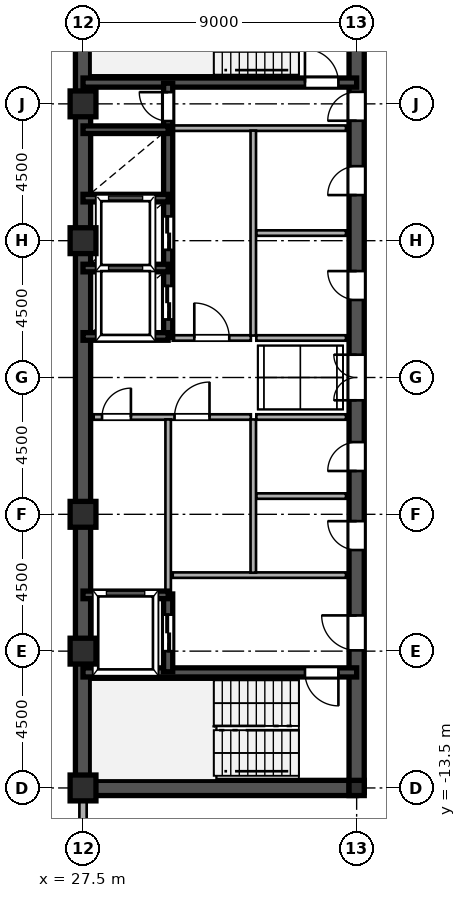
"""IFC4 building model, lengths in metres.
Left out: names, types, materials, properties, quantities, classifications, styles, units other than length and angle.
Written with IfcOpenShell. Run it as: python <this file> out.ifc"""

import sys

from ifc_helpers import new_model, si_unit, direction, frame, frame_2d, origin, origin_2d, place, context, subcontext, project, spatial, rectangle, hollow_rectangle, i_section, extrude, source, transform, mapped, element, fill, save


model = new_model("IFC4")
c1 = context("Model", 3, precision=1e-05, world=origin(), true_north=direction((0.0, 1.0)))
c2 = subcontext(c1, "Body", "Model", "MODEL_VIEW")
j1 = project(units=[si_unit("LENGTHUNIT", "METRE"), si_unit("PLANEANGLEUNIT", "RADIAN")], contexts=[c1])
p1 = place(None, origin())
s1 = spatial("IfcSite", under=j1, at=p1, CompositionType="ELEMENT")
p2 = place(p1, origin())
s2 = spatial("IfcBuilding", under=s1, at=p2, CompositionType="ELEMENT")
p3 = place(p2, frame((0.0, 0.0, 210.3)))
s3 = spatial("IfcBuildingStorey", under=s2, at=p3, CompositionType="ELEMENT", Elevation=210.3)
m1 = source(origin(), c2, "Body", "SweptSolid", [
    extrude(hollow_rectangle(XDim=0.85, YDim=0.85, WallThickness=0.036, at=origin_2d()), origin(), (0.0, 0.0, 1.0), 3.6),
])
for number, where, z_axis, x_axis in (
    (1, (27.5, -13.5, 0.0), (0.0, 0.0, 1.0), (1.0, 0.0, 0.0)),
    (2, (27.5, -9.0, 0.0), (0.0, 0.0, 1.0), (1.0, 0.0, 0.0)),
    (3, (27.5, -4.5, 0.0), (0.0, 0.0, 1.0), (1.0, 0.0, 0.0)),
    (4, (27.5, 4.5, 0.0), (0.0, 0.0, 1.0), (1.0, 0.0, 0.0)),
    (5, (27.5, 9.0, 0.0), (0.0, 0.0, 1.0), (1.0, 0.0, 0.0)),
):
    element("IfcColumn", number, at=place(p3, frame(where, z_axis=z_axis, x_axis=x_axis)), inside=s3, PredefinedType="COLUMN", context=c2, shape_type="MappedRepresentation", body=[
        mapped(m1, transform((0.0, 0.0, 0.0), scale=1.0)),
    ])
m2 = source(origin(), c2, "Body", "SweptSolid", [
    extrude(i_section(OverallWidth=0.5, OverallDepth=0.5, WebThickness=0.02, FlangeThickness=0.032, at=origin_2d()), origin(), (0.0, 0.0, 1.0), 3.6),
])
p4 = place(p3, frame((36.5, -13.5, 0.0), z_axis=(0.0, 0.0, 1.0), x_axis=(1.0, 0.0, 0.0)))
e6 = element("IfcColumn", 6, at=p4, inside=s3, PredefinedType="COLUMN", context=c2, shape_type="MappedRepresentation", body=[
    mapped(m2, transform((0.0, 0.0, 0.0), scale=1.0)),
])
p5 = place(p3, frame((27.5, -15.98, 0.0), z_axis=(0.0, 0.0, 1.0), x_axis=(0.0, 1.0, 0.0)))
e7 = element("IfcWall", 7, at=p5, inside=s3, PredefinedType="SOLIDWALL", context=c2, shape_type="SweptSolid", body=[
    extrude(rectangle(XDim=1.605, YDim=0.24, at=frame_2d((0.803, 0.0))), origin(), (0.0, 0.0, 1.0), 3.38),
])
p6 = place(p3, frame((27.5, -14.375, 0.0), z_axis=(0.0, 0.0, 1.0), x_axis=(0.0, 1.0, 0.0)))
e8 = element("IfcWall", 8, at=p6, inside=s3, PredefinedType="SOLIDWALL", context=c2, shape_type="SweptSolid", body=[
    extrude(rectangle(XDim=0.62, YDim=0.24, at=frame_2d((0.31, 0.0))), origin(), (0.0, 0.0, 1.0), 2.88),
])
for number, where, z_axis, x_axis in (
    (9, (27.5, -13.5, 0.0), (0.0, 0.0, 1.0), (0.0, 1.0, 0.0)),
    (10, (27.5, 1.3, 0.0), (0.0, 0.0, 1.0), (0.0, 1.0, 0.0)),
):
    element("IfcWall", number, at=place(p3, frame(where, z_axis=z_axis, x_axis=x_axis)), inside=s3, PredefinedType="SHEAR", context=c2, shape_type="SweptSolid", body=[
        extrude(rectangle(XDim=12.2, YDim=0.5, at=frame_2d((6.1, 0.0))), origin(), (0.0, 0.0, 1.0), 3.38),
    ])
p7 = place(p3, frame((27.5, -1.3, 0.0), z_axis=(0.0, 0.0, 1.0), x_axis=(0.0, 1.0, 0.0)))
e11 = element("IfcWall", 11, at=p7, inside=s3, PredefinedType="SHEAR", context=c2, shape_type="SweptSolid", body=[
    extrude(rectangle(XDim=2.6, YDim=0.5, at=frame_2d((1.3, 0.0))), origin(), (0.0, 0.0, 1.0), 3.38),
])
p8 = place(p3, frame((27.5, -13.5, 0.0), z_axis=(0.0, 0.0, 1.0), x_axis=(1.0, 0.0, 0.0)))
e12 = element("IfcWall", 12, at=p8, inside=s3, PredefinedType="SHEAR", context=c2, shape_type="SweptSolid", body=[
    extrude(rectangle(XDim=9.0, YDim=0.5, at=frame_2d((4.5, 0.0))), origin(), (0.0, 0.0, 1.0), 3.38),
])
p9 = place(p3, frame((36.5, -13.65, 0.0), z_axis=(0.0, 0.0, 1.0), x_axis=(0.0, 1.0, 0.0)))
e13 = element("IfcWall", 13, at=p9, inside=s3, PredefinedType="SHEAR", context=c2, shape_type="SweptSolid", body=[
    extrude(rectangle(XDim=7.15, YDim=0.5, at=frame_2d((3.575, 0.0))), origin(), (0.0, 0.0, 1.0), 3.38),
])
p10 = place(p9, frame((4.675, 0.0, 0.0)))
e14 = element("IfcOpeningElement", 14, at=p10, cuts=e13, PredefinedType="OPENING", context=c2, shape_type="SweptSolid", body=[
    extrude(rectangle(XDim=1.15, YDim=2.2, at=frame_2d((0.575, 1.1))), frame((0.0, 0.26, 0.0), z_axis=(0.0, -1.0, 0.0), x_axis=(1.0, 0.0, 0.0)), (0.0, 0.0, 1.0), 0.52),
])
p11 = place(p3, frame((36.5, -1.3, 0.0), z_axis=(0.0, 0.0, 1.0), x_axis=(0.0, 1.0, 0.0)))
e15 = element("IfcWall", 15, at=p11, inside=s3, PredefinedType="SHEAR", context=c2, shape_type="SweptSolid", body=[
    extrude(rectangle(XDim=2.6, YDim=0.5, at=frame_2d((1.3, 0.0))), origin(), (0.0, 0.0, 1.0), 3.38),
])
p12 = place(p11, frame((0.55, 0.0, 0.0)))
e16 = element("IfcOpeningElement", 16, at=p12, cuts=e15, PredefinedType="OPENING", context=c2, shape_type="SweptSolid", body=[
    extrude(rectangle(XDim=1.5, YDim=2.3, at=frame_2d((0.75, 1.15))), frame((0.0, 0.26, 0.0), z_axis=(0.0, -1.0, 0.0), x_axis=(1.0, 0.0, 0.0)), (0.0, 0.0, 1.0), 0.52),
])
p13 = place(p3, frame((36.5, 8.2, 0.0), z_axis=(0.0, 0.0, 1.0), x_axis=(0.0, 1.0, 0.0)))
e17 = element("IfcWall", 17, at=p13, inside=s3, PredefinedType="SHEAR", context=c2, shape_type="SweptSolid", body=[
    extrude(rectangle(XDim=5.45, YDim=0.5, at=frame_2d((2.725, 0.0))), origin(), (0.0, 0.0, 1.0), 3.38),
])
p14 = place(p13, frame((0.245, 0.0, 0.0)))
e18 = element("IfcOpeningElement", 18, at=p14, cuts=e17, PredefinedType="OPENING", context=c2, shape_type="SweptSolid", body=[
    extrude(rectangle(XDim=0.95, YDim=2.15, at=frame_2d((0.475, 1.075))), frame((0.0, 0.26, 0.0), z_axis=(0.0, -1.0, 0.0), x_axis=(1.0, 0.0, 0.0)), (0.0, 0.0, 1.0), 0.52),
])
p15 = place(p3, frame((36.5, -6.5, 0.0), z_axis=(0.0, 0.0, 1.0), x_axis=(0.0, 1.0, 0.0)))
e19 = element("IfcWall", 19, at=p15, inside=s3, PredefinedType="SHEAR", context=c2, shape_type="SweptSolid", body=[
    extrude(rectangle(XDim=2.6, YDim=0.5, at=frame_2d((1.3, 0.0))), origin(), (0.0, 0.0, 1.0), 3.38),
])
p16 = place(p15, frame((0.825, 0.0, 0.0)))
e20 = element("IfcOpeningElement", 20, at=p16, cuts=e19, PredefinedType="OPENING", context=c2, shape_type="SweptSolid", body=[
    extrude(rectangle(XDim=0.95, YDim=2.15, at=frame_2d((0.475, 1.075))), frame((0.0, 0.26, 0.0), z_axis=(0.0, -1.0, 0.0), x_axis=(1.0, 0.0, 0.0)), (0.0, 0.0, 1.0), 0.52),
])
p17 = place(p3, frame((36.5, -3.9, 0.0), z_axis=(0.0, 0.0, 1.0), x_axis=(0.0, 1.0, 0.0)))
e21 = element("IfcWall", 21, at=p17, inside=s3, PredefinedType="SHEAR", context=c2, shape_type="SweptSolid", body=[
    extrude(rectangle(XDim=2.6, YDim=0.5, at=frame_2d((1.3, 0.0))), origin(), (0.0, 0.0, 1.0), 3.38),
])
p18 = place(p17, frame((0.825, 0.0, 0.0)))
e22 = element("IfcOpeningElement", 22, at=p18, cuts=e21, PredefinedType="OPENING", context=c2, shape_type="SweptSolid", body=[
    extrude(rectangle(XDim=0.95, YDim=2.15, at=frame_2d((0.475, 1.075))), frame((0.0, 0.26, 0.0), z_axis=(0.0, -1.0, 0.0), x_axis=(1.0, 0.0, 0.0)), (0.0, 0.0, 1.0), 0.52),
])
p19 = place(p3, frame((36.5, 1.3, 0.0), z_axis=(0.0, 0.0, 1.0), x_axis=(0.0, 1.0, 0.0)))
e23 = element("IfcWall", 23, at=p19, inside=s3, PredefinedType="SHEAR", context=c2, shape_type="SweptSolid", body=[
    extrude(rectangle(XDim=3.45, YDim=0.5, at=frame_2d((1.725, 0.0))), origin(), (0.0, 0.0, 1.0), 3.38),
])
p20 = place(p19, frame((1.25, 0.0, 0.0)))
e24 = element("IfcOpeningElement", 24, at=p20, cuts=e23, PredefinedType="OPENING", context=c2, shape_type="SweptSolid", body=[
    extrude(rectangle(XDim=0.95, YDim=2.15, at=frame_2d((0.475, 1.075))), frame((0.0, 0.26, 0.0), z_axis=(0.0, -1.0, 0.0), x_axis=(1.0, 0.0, 0.0)), (0.0, 0.0, 1.0), 0.52),
])
p21 = place(p3, frame((36.5, 4.75, 0.0), z_axis=(0.0, 0.0, 1.0), x_axis=(0.0, 1.0, 0.0)))
e25 = element("IfcWall", 25, at=p21, inside=s3, PredefinedType="SHEAR", context=c2, shape_type="SweptSolid", body=[
    extrude(rectangle(XDim=3.45, YDim=0.5, at=frame_2d((1.725, 0.0))), origin(), (0.0, 0.0, 1.0), 3.38),
])
p22 = place(p21, frame((1.25, 0.0, 0.0)))
e26 = element("IfcOpeningElement", 26, at=p22, cuts=e25, PredefinedType="OPENING", context=c2, shape_type="SweptSolid", body=[
    extrude(rectangle(XDim=0.95, YDim=2.15, at=frame_2d((0.475, 1.075))), frame((0.0, 0.26, 0.0), z_axis=(0.0, -1.0, 0.0), x_axis=(1.0, 0.0, 0.0)), (0.0, 0.0, 1.0), 0.52),
])
p23 = place(p3, frame((27.5, -9.7, 0.0), z_axis=(0.0, 0.0, 1.0), x_axis=(1.0, 0.0, 0.0)))
e27 = element("IfcWall", 27, at=p23, inside=s3, PredefinedType="SHEAR", context=c2, shape_type="SweptSolid", body=[
    extrude(rectangle(XDim=9.0, YDim=0.3, at=frame_2d((4.5, 0.0))), origin(), (0.0, 0.0, 1.0), 3.38),
])
p24 = place(p23, frame((7.3, 0.0, 0.0)))
e28 = element("IfcOpeningElement", 28, at=p24, cuts=e27, PredefinedType="OPENING", context=c2, shape_type="SweptSolid", body=[
    extrude(rectangle(XDim=1.1, YDim=2.2, at=frame_2d((0.55, 1.1))), frame((0.0, 0.16, 0.0), z_axis=(0.0, -1.0, 0.0), x_axis=(1.0, 0.0, 0.0)), (0.0, 0.0, 1.0), 0.32),
])
p25 = place(p3, frame((27.5, 9.7, 0.0), z_axis=(0.0, 0.0, 1.0), x_axis=(1.0, 0.0, 0.0)))
e29 = element("IfcWall", 29, at=p25, inside=s3, PredefinedType="SHEAR", context=c2, shape_type="SweptSolid", body=[
    extrude(rectangle(XDim=9.0, YDim=0.3, at=frame_2d((4.5, 0.0))), origin(), (0.0, 0.0, 1.0), 3.38),
])
p26 = place(p25, frame((7.3, 0.0, 0.0)))
e30 = element("IfcOpeningElement", 30, at=p26, cuts=e29, PredefinedType="OPENING", context=c2, shape_type="SweptSolid", body=[
    extrude(rectangle(XDim=1.1, YDim=2.2, at=frame_2d((0.55, 1.1))), frame((0.0, 0.16, 0.0), z_axis=(0.0, -1.0, 0.0), x_axis=(1.0, 0.0, 0.0)), (0.0, 0.0, 1.0), 0.32),
])
for number, where, z_axis, x_axis in (
    (31, (27.5, -7.15, 0.0), (0.0, 0.0, 1.0), (1.0, 0.0, 0.0)),
    (32, (27.5, 1.35, 0.0), (0.0, 0.0, 1.0), (1.0, 0.0, 0.0)),
    (33, (27.5, 3.6, 0.0), (0.0, 0.0, 1.0), (1.0, 0.0, 0.0)),
    (34, (27.5, 5.9, 0.0), (0.0, 0.0, 1.0), (1.0, 0.0, 0.0)),
    (35, (27.5, 8.15, 0.0), (0.0, 0.0, 1.0), (1.0, 0.0, 0.0)),
):
    element("IfcWall", number, at=place(p3, frame(where, z_axis=z_axis, x_axis=x_axis)), inside=s3, PredefinedType="SHEAR", context=c2, shape_type="SweptSolid", body=[
        extrude(rectangle(XDim=2.8, YDim=0.25, at=frame_2d((1.4, 0.0))), origin(), (0.0, 0.0, 1.0), 3.38),
    ])
p27 = place(p3, frame((30.3, -9.68, 0.0), z_axis=(0.0, 0.0, 1.0), x_axis=(0.0, 1.0, 0.0)))
e36 = element("IfcWall", 36, at=p27, inside=s3, PredefinedType="SHEAR", context=c2, shape_type="SweptSolid", body=[
    extrude(rectangle(XDim=2.56, YDim=0.3, at=frame_2d((1.28, 0.0))), origin(), (0.0, 0.0, 1.0), 3.38),
])
p28 = place(p27, frame((0.68, 0.0, 0.0)))
e37 = element("IfcOpeningElement", 37, at=p28, cuts=e36, PredefinedType="OPENING", context=c2, shape_type="SweptSolid", body=[
    extrude(rectangle(XDim=1.2, YDim=2.25, at=frame_2d((0.6, 1.125))), frame((0.0, 0.16, 0.0), z_axis=(0.0, -1.0, 0.0), x_axis=(1.0, 0.0, 0.0)), (0.0, 0.0, 1.0), 0.32),
])
p29 = place(p3, frame((30.3, 1.32, 0.0), z_axis=(0.0, 0.0, 1.0), x_axis=(0.0, 1.0, 0.0)))
e38 = element("IfcWall", 38, at=p29, inside=s3, PredefinedType="SHEAR", context=c2, shape_type="SweptSolid", body=[
    extrude(rectangle(XDim=2.28, YDim=0.3, at=frame_2d((1.14, 0.0))), origin(), (0.0, 0.0, 1.0), 3.38),
])
p30 = place(p29, frame((0.59, 0.0, 0.0)))
e39 = element("IfcOpeningElement", 39, at=p30, cuts=e38, PredefinedType="OPENING", context=c2, shape_type="SweptSolid", body=[
    extrude(rectangle(XDim=1.1, YDim=2.2, at=frame_2d((0.55, 1.1))), frame((0.0, 0.16, 0.0), z_axis=(0.0, -1.0, 0.0), x_axis=(1.0, 0.0, 0.0)), (0.0, 0.0, 1.0), 0.32),
])
p31 = place(p3, frame((30.3, 3.6, 0.0), z_axis=(0.0, 0.0, 1.0), x_axis=(0.0, 1.0, 0.0)))
e40 = element("IfcWall", 40, at=p31, inside=s3, PredefinedType="SHEAR", context=c2, shape_type="SweptSolid", body=[
    extrude(rectangle(XDim=2.3, YDim=0.3, at=frame_2d((1.15, 0.0))), origin(), (0.0, 0.0, 1.0), 3.38),
])
p32 = place(p31, frame((0.6, 0.0, 0.0)))
e41 = element("IfcOpeningElement", 41, at=p32, cuts=e40, PredefinedType="OPENING", context=c2, shape_type="SweptSolid", body=[
    extrude(rectangle(XDim=1.1, YDim=2.2, at=frame_2d((0.55, 1.1))), frame((0.0, 0.16, 0.0), z_axis=(0.0, -1.0, 0.0), x_axis=(1.0, 0.0, 0.0)), (0.0, 0.0, 1.0), 0.32),
])
p33 = place(p3, frame((30.3, 5.9, 0.0), z_axis=(0.0, 0.0, 1.0), x_axis=(0.0, 1.0, 0.0)))
e42 = element("IfcWall", 42, at=p33, inside=s3, PredefinedType="SHEAR", context=c2, shape_type="SweptSolid", body=[
    extrude(rectangle(XDim=2.25, YDim=0.3, at=frame_2d((1.125, 0.0))), origin(), (0.0, 0.0, 1.0), 3.38),
])
p34 = place(p3, frame((30.3, 8.15, 0.0), z_axis=(0.0, 0.0, 1.0), x_axis=(0.0, 1.0, 0.0)))
e43 = element("IfcWall", 43, at=p34, inside=s3, PredefinedType="SHEAR", context=c2, shape_type="SweptSolid", body=[
    extrude(rectangle(XDim=1.53, YDim=0.3, at=frame_2d((0.765, 0.0))), origin(), (0.0, 0.0, 1.0), 3.38),
])
p35 = place(p34, frame((0.285, 0.0, 0.0)))
e44 = element("IfcOpeningElement", 44, at=p35, cuts=e43, PredefinedType="OPENING", context=c2, shape_type="SweptSolid", body=[
    extrude(rectangle(XDim=0.95, YDim=2.15, at=frame_2d((0.475, 1.075))), frame((0.0, 0.16, 0.0), z_axis=(0.0, -1.0, 0.0), x_axis=(1.0, 0.0, 0.0)), (0.0, 0.0, 1.0), 0.32),
])
for number, where, z_axis, x_axis in (
    (45, (30.45, -6.5, 0.0), (0.0, 0.0, 1.0), (1.0, 0.0, 0.0)),
    (46, (30.45, 8.2, 0.0), (0.0, 0.0, 1.0), (1.0, 0.0, 0.0)),
):
    element("IfcWall", number, at=place(p3, frame(where, z_axis=z_axis, x_axis=x_axis)), inside=s3, PredefinedType="PARTITIONING", context=c2, shape_type="SweptSolid", body=[
        extrude(rectangle(XDim=5.7, YDim=0.18, at=frame_2d((2.85, 0.0))), origin(), (0.0, 0.0, 1.0), 3.38),
    ])
p36 = place(p3, frame((33.1, -6.42, 0.0), z_axis=(0.0, 0.0, 1.0), x_axis=(0.0, 1.0, 0.0)))
e47 = element("IfcWall", 47, at=p36, inside=s3, PredefinedType="PARTITIONING", context=c2, shape_type="SweptSolid", body=[
    extrude(rectangle(XDim=5.04, YDim=0.18, at=frame_2d((2.52, 0.0))), origin(), (0.0, 0.0, 1.0), 3.38),
])
p37 = place(p3, frame((33.1, 1.38, 0.0), z_axis=(0.0, 0.0, 1.0), x_axis=(0.0, 1.0, 0.0)))
e48 = element("IfcWall", 48, at=p37, inside=s3, PredefinedType="PARTITIONING", context=c2, shape_type="SweptSolid", body=[
    extrude(rectangle(XDim=6.74, YDim=0.18, at=frame_2d((3.37, 0.0))), origin(), (0.0, 0.0, 1.0), 3.38),
])
p38 = place(p3, frame((27.85, -1.3, 0.0), z_axis=(0.0, 0.0, 1.0), x_axis=(1.0, 0.0, 0.0)))
e49 = element("IfcWall", 49, at=p38, inside=s3, PredefinedType="PARTITIONING", context=c2, shape_type="SweptSolid", body=[
    extrude(rectangle(XDim=2.45, YDim=0.18, at=frame_2d((1.225, 0.0))), origin(), (0.0, 0.0, 1.0), 3.38),
])
p39 = place(p38, frame((0.275, 0.0, 0.0)))
e50 = element("IfcOpeningElement", 50, at=p39, cuts=e49, PredefinedType="OPENING", context=c2, shape_type="SweptSolid", body=[
    extrude(rectangle(XDim=0.95, YDim=2.15, at=frame_2d((0.475, 1.075))), frame((0.0, 0.1, 0.0), z_axis=(0.0, -1.0, 0.0), x_axis=(1.0, 0.0, 0.0)), (0.0, 0.0, 1.0), 0.2),
])
p40 = place(p3, frame((30.3, -1.3, 0.0), z_axis=(0.0, 0.0, 1.0), x_axis=(1.0, 0.0, 0.0)))
e51 = element("IfcWall", 51, at=p40, inside=s3, PredefinedType="PARTITIONING", context=c2, shape_type="SweptSolid", body=[
    extrude(rectangle(XDim=2.72, YDim=0.18, at=frame_2d((1.36, 0.0))), origin(), (0.0, 0.0, 1.0), 3.38),
])
p41 = place(p40, frame((0.21, 0.0, 0.0)))
e52 = element("IfcOpeningElement", 52, at=p41, cuts=e51, PredefinedType="OPENING", context=c2, shape_type="SweptSolid", body=[
    extrude(rectangle(XDim=1.15, YDim=2.2, at=frame_2d((0.575, 1.1))), frame((0.0, 0.1, 0.0), z_axis=(0.0, -1.0, 0.0), x_axis=(1.0, 0.0, 0.0)), (0.0, 0.0, 1.0), 0.2),
])
p42 = place(p3, frame((30.3, -7.12, 0.0), z_axis=(0.0, 0.0, 1.0), x_axis=(0.0, 1.0, 0.0)))
e53 = element("IfcWall", 53, at=p42, inside=s3, PredefinedType="PARTITIONING", context=c2, shape_type="SweptSolid", body=[
    extrude(rectangle(XDim=5.74, YDim=0.18, at=frame_2d((2.87, 0.0))), origin(), (0.0, 0.0, 1.0), 3.38),
])
p43 = place(p3, frame((30.45, 1.3, 0.0), z_axis=(0.0, 0.0, 1.0), x_axis=(1.0, 0.0, 0.0)))
e54 = element("IfcWall", 54, at=p43, inside=s3, PredefinedType="PARTITIONING", context=c2, shape_type="SweptSolid", body=[
    extrude(rectangle(XDim=2.57, YDim=0.18, at=frame_2d((1.285, 0.0))), origin(), (0.0, 0.0, 1.0), 3.38),
])
p44 = place(p43, frame((0.71, 0.0, 0.0)))
e55 = element("IfcOpeningElement", 55, at=p44, cuts=e54, PredefinedType="OPENING", context=c2, shape_type="SweptSolid", body=[
    extrude(rectangle(XDim=1.15, YDim=2.2, at=frame_2d((0.575, 1.1))), frame((0.0, 0.1, 0.0), z_axis=(0.0, -1.0, 0.0), x_axis=(1.0, 0.0, 0.0)), (0.0, 0.0, 1.0), 0.2),
])
for number, where, z_axis, x_axis in (
    (56, (33.2, -1.3, 0.0), (0.0, 0.0, 1.0), (1.0, 0.0, 0.0)),
    (57, (33.2, 1.3, 0.0), (0.0, 0.0, 1.0), (1.0, 0.0, 0.0)),
    (58, (33.2, -3.9, 0.0), (0.0, 0.0, 1.0), (1.0, 0.0, 0.0)),
    (59, (33.2, 4.75, 0.0), (0.0, 0.0, 1.0), (1.0, 0.0, 0.0)),
):
    element("IfcWall", number, at=place(p3, frame(where, z_axis=z_axis, x_axis=x_axis)), inside=s3, PredefinedType="PARTITIONING", context=c2, shape_type="SweptSolid", body=[
        extrude(rectangle(XDim=2.95, YDim=0.18, at=frame_2d((1.475, 0.0))), origin(), (0.0, 0.0, 1.0), 3.38),
    ])
m3 = source(origin(), c2, "Body", "SweptSolid", [
    extrude(rectangle(XDim=1.15, YDim=2.2, at=frame_2d((0.575, 1.1))), frame((0.0, 0.025, 0.0), z_axis=(0.0, -1.0, 0.0), x_axis=(1.0, 0.0, 0.0)), (0.0, 0.0, 1.0), 0.05),
])
p45 = place(p10, origin())
e60 = element("IfcDoor", 60, at=p45, inside=s3, OperationType="SINGLE_SWING_RIGHT", PredefinedType="DOOR", context=c2, shape_type="MappedRepresentation", body=[
    mapped(m3, transform((0.0, 0.0, 0.0), scale=1.0)),
])
fill(e14, e60)
m4 = source(origin(), c2, "Body", "SweptSolid", [
    extrude(rectangle(XDim=1.5, YDim=2.3, at=frame_2d((0.75, 1.15))), frame((0.0, 0.025, 0.0), z_axis=(0.0, -1.0, 0.0), x_axis=(1.0, 0.0, 0.0)), (0.0, 0.0, 1.0), 0.05),
])
p46 = place(p12, origin())
e61 = element("IfcDoor", 61, at=p46, inside=s3, OperationType="DOUBLE_SWING_LEFT", PredefinedType="DOOR", context=c2, shape_type="MappedRepresentation", body=[
    mapped(m4, transform((0.0, 0.0, 0.0), scale=1.0)),
])
fill(e16, e61)
m5 = source(origin(), c2, "Body", "SweptSolid", [
    extrude(rectangle(XDim=0.95, YDim=2.15, at=frame_2d((0.475, 1.075))), frame((0.0, 0.025, 0.0), z_axis=(0.0, -1.0, 0.0), x_axis=(1.0, 0.0, 0.0)), (0.0, 0.0, 1.0), 0.05),
])
p47 = place(p14, origin())
e62 = element("IfcDoor", 62, at=p47, inside=s3, OperationType="SINGLE_SWING_LEFT", PredefinedType="DOOR", context=c2, shape_type="MappedRepresentation", body=[
    mapped(m5, transform((0.0, 0.0, 0.0), scale=1.0)),
])
fill(e18, e62)
p48 = place(p16, origin())
e63 = element("IfcDoor", 63, at=p48, inside=s3, OperationType="SINGLE_SWING_RIGHT", PredefinedType="DOOR", context=c2, shape_type="MappedRepresentation", body=[
    mapped(m5, transform((0.0, 0.0, 0.0), scale=1.0)),
])
fill(e20, e63)
p49 = place(p18, origin())
e64 = element("IfcDoor", 64, at=p49, inside=s3, OperationType="SINGLE_SWING_LEFT", PredefinedType="DOOR", context=c2, shape_type="MappedRepresentation", body=[
    mapped(m5, transform((0.0, 0.0, 0.0), scale=1.0)),
])
fill(e22, e64)
p50 = place(p20, origin())
e65 = element("IfcDoor", 65, at=p50, inside=s3, OperationType="SINGLE_SWING_RIGHT", PredefinedType="DOOR", context=c2, shape_type="MappedRepresentation", body=[
    mapped(m5, transform((0.0, 0.0, 0.0), scale=1.0)),
])
fill(e24, e65)
p51 = place(p22, origin())
e66 = element("IfcDoor", 66, at=p51, inside=s3, OperationType="SINGLE_SWING_LEFT", PredefinedType="DOOR", context=c2, shape_type="MappedRepresentation", body=[
    mapped(m5, transform((0.0, 0.0, 0.0), scale=1.0)),
])
fill(e26, e66)
m6 = source(origin(), c2, "Body", "SweptSolid", [
    extrude(rectangle(XDim=1.1, YDim=2.2, at=frame_2d((0.55, 1.1))), frame((0.0, 0.025, 0.0), z_axis=(0.0, -1.0, 0.0), x_axis=(1.0, 0.0, 0.0)), (0.0, 0.0, 1.0), 0.05),
])
p52 = place(p24, frame((1.1, 0.0, 0.0), z_axis=(0.0, 0.0, 1.0), x_axis=(-1.0, 0.0, 0.0)))
e67 = element("IfcDoor", 67, at=p52, inside=s3, OperationType="SINGLE_SWING_RIGHT", PredefinedType="DOOR", context=c2, shape_type="MappedRepresentation", body=[
    mapped(m6, transform((0.0, 0.0, 0.0), scale=1.0)),
])
fill(e28, e67)
p53 = place(p26, origin())
e68 = element("IfcDoor", 68, at=p53, inside=s3, OperationType="SINGLE_SWING_LEFT", PredefinedType="DOOR", context=c2, shape_type="MappedRepresentation", body=[
    mapped(m6, transform((0.0, 0.0, 0.0), scale=1.0)),
])
fill(e30, e68)
m7 = source(origin(), c2, "Body", "SweptSolid", [
    extrude(rectangle(XDim=1.2, YDim=2.25, at=frame_2d((0.6, 1.125))), frame((0.0, 0.025, 0.0), z_axis=(0.0, -1.0, 0.0), x_axis=(1.0, 0.0, 0.0)), (0.0, 0.0, 1.0), 0.05),
])
p54 = place(p28, origin())
e69 = element("IfcDoor", 69, at=p54, inside=s3, OperationType="DOUBLE_DOOR_SLIDING", PredefinedType="DOOR", context=c2, shape_type="MappedRepresentation", body=[
    mapped(m7, transform((0.0, 0.0, 0.0), scale=1.0)),
])
fill(e37, e69)
m8 = source(origin(), c2, "Body", "SweptSolid", [
    extrude(rectangle(XDim=1.1, YDim=2.2, at=frame_2d((0.55, 1.1))), frame((0.0, 0.025, 0.0), z_axis=(0.0, -1.0, 0.0), x_axis=(1.0, 0.0, 0.0)), (0.0, 0.0, 1.0), 0.05),
])
p55 = place(p30, origin())
e70 = element("IfcDoor", 70, at=p55, inside=s3, OperationType="DOUBLE_DOOR_SLIDING", PredefinedType="DOOR", context=c2, shape_type="MappedRepresentation", body=[
    mapped(m8, transform((0.0, 0.0, 0.0), scale=1.0)),
])
fill(e39, e70)
p56 = place(p32, origin())
e71 = element("IfcDoor", 71, at=p56, inside=s3, OperationType="DOUBLE_DOOR_SLIDING", PredefinedType="DOOR", context=c2, shape_type="MappedRepresentation", body=[
    mapped(m8, transform((0.0, 0.0, 0.0), scale=1.0)),
])
fill(e41, e71)
p57 = place(p35, origin())
e72 = element("IfcDoor", 72, at=p57, inside=s3, OperationType="SINGLE_SWING_RIGHT", PredefinedType="DOOR", context=c2, shape_type="MappedRepresentation", body=[
    mapped(m5, transform((0.0, 0.0, 0.0), scale=1.0)),
])
fill(e44, e72)
p58 = place(p39, origin())
e73 = element("IfcDoor", 73, at=p58, inside=s3, OperationType="SINGLE_SWING_RIGHT", PredefinedType="DOOR", context=c2, shape_type="MappedRepresentation", body=[
    mapped(m5, transform((0.0, 0.0, 0.0), scale=1.0)),
])
fill(e50, e73)
p59 = place(p41, origin())
e74 = element("IfcDoor", 74, at=p59, inside=s3, OperationType="SINGLE_SWING_RIGHT", PredefinedType="DOOR", context=c2, shape_type="MappedRepresentation", body=[
    mapped(m3, transform((0.0, 0.0, 0.0), scale=1.0)),
])
fill(e52, e74)
p60 = place(p44, origin())
e75 = element("IfcDoor", 75, at=p60, inside=s3, OperationType="SINGLE_SWING_LEFT", PredefinedType="DOOR", context=c2, shape_type="MappedRepresentation", body=[
    mapped(m3, transform((0.0, 0.0, 0.0), scale=1.0)),
])
fill(e55, e75)
save(model, sys.argv[1])
